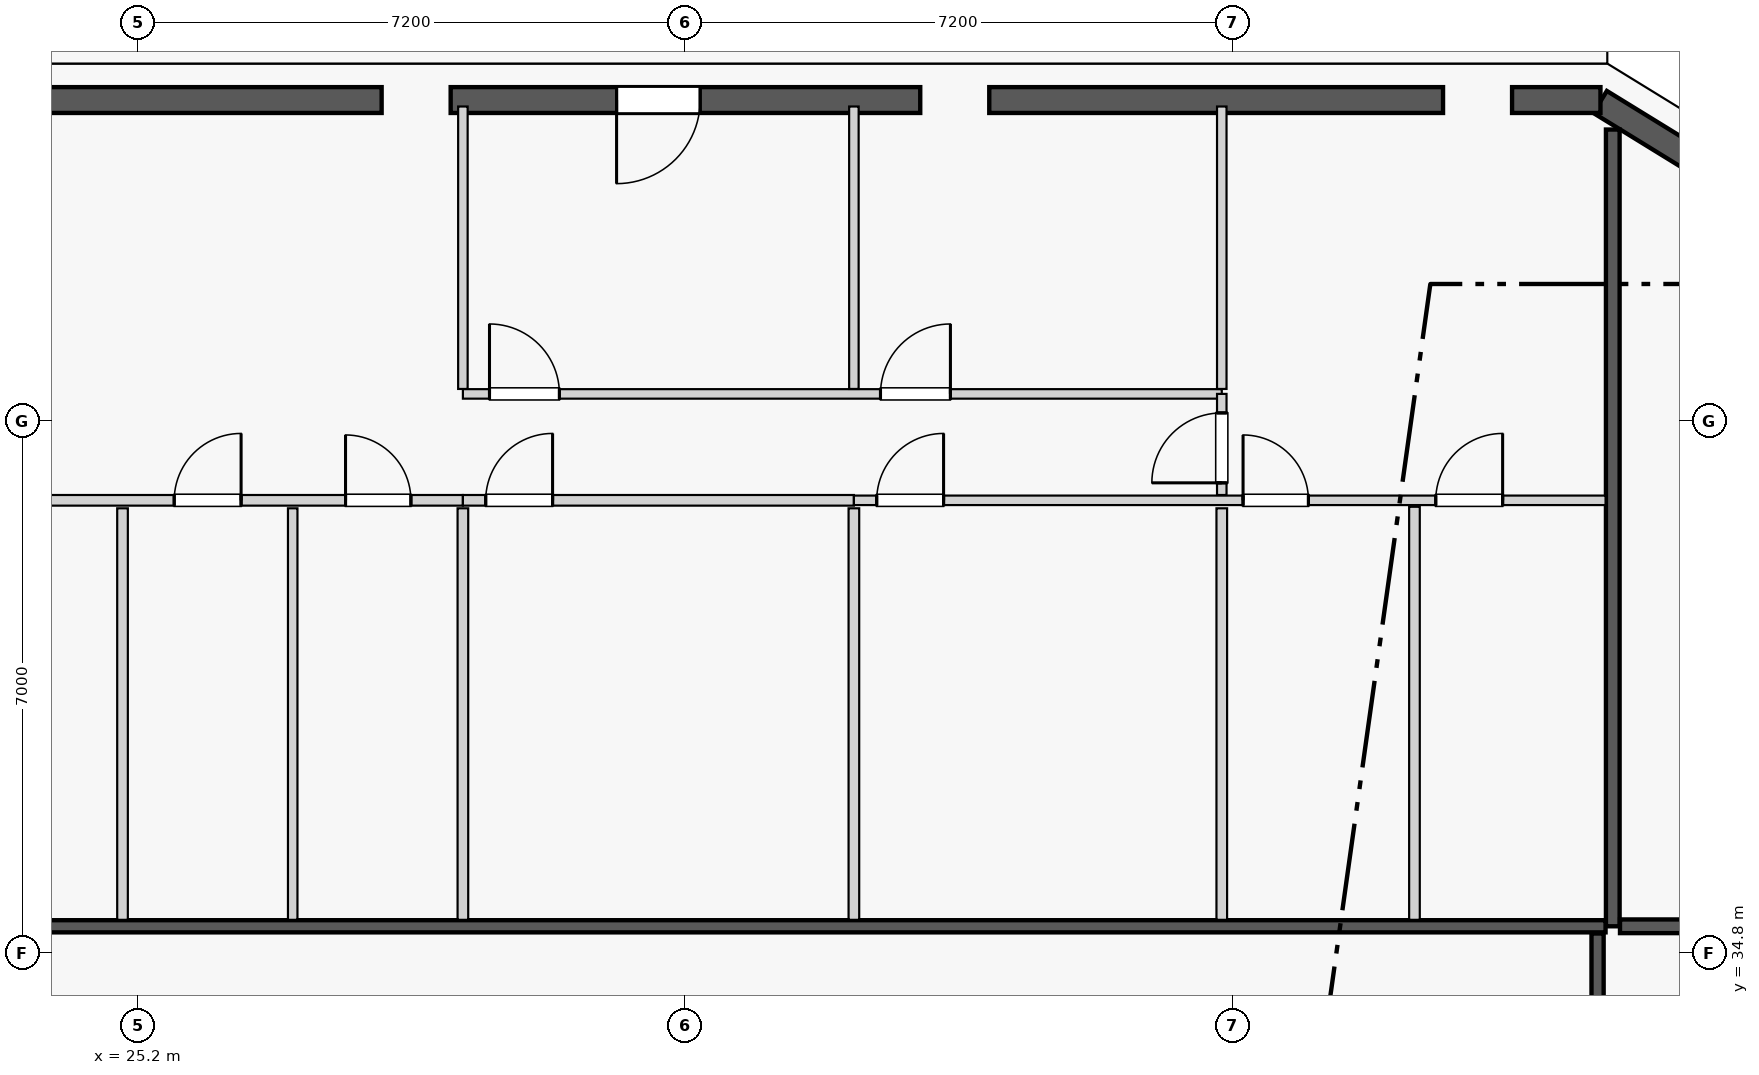
"""IFC4 building model, lengths in metres.
Left out: names, types, materials, properties, quantities, classifications, styles, units other than length and angle.
Written with IfcOpenShell. Run it as: python <this file> out.ifc"""

import sys

from ifc_helpers import new_model, si_unit, direction, frame, frame_2d, origin, origin_2d, place, context, subcontext, project, spatial, rectangle, extrude, element, fill, save


model = new_model("IFC4")
c1 = context("Model", 3, precision=1e-05, world=origin(), true_north=direction((0.0, 1.0)))
c2 = subcontext(c1, "Body", "Model", "MODEL_VIEW")
j1 = project(units=[si_unit("LENGTHUNIT", "METRE"), si_unit("PLANEANGLEUNIT", "RADIAN")], contexts=[c1])
p1 = place(None, origin())
s1 = spatial("IfcSite", under=j1, at=p1, CompositionType="ELEMENT")
p2 = place(p1, origin())
s2 = spatial("IfcBuilding", under=s1, at=p2, CompositionType="ELEMENT")
p3 = place(p2, frame((0.0, 0.0, 186.1)))
s3 = spatial("IfcBuildingStorey", under=s2, at=p3, CompositionType="ELEMENT", Elevation=186.1)
for number, where, z_axis, x_axis in (
    (1, (42.821, 46.011, 0.0), (0.0, 0.0, 1.0), (1.0, 0.0, 0.0)),
    (2, (35.943, 45.958, 0.0), (0.0, 0.0, 1.0), (1.0, 0.0, 0.0)),
    (3, (28.857, 45.958, 0.0), (0.0, 0.0, 1.0), (1.0, 0.0, 0.0)),
):
    element("IfcColumn", number, at=place(p3, frame(where, z_axis=z_axis, x_axis=x_axis)), inside=s3, PredefinedType="COLUMN", context=c2, shape_type="SweptSolid", body=[
        extrude(rectangle(XDim=0.9, YDim=0.9, at=origin_2d()), origin(), (0.0, 0.0, 1.0), 3.55),
    ])
p4 = place(p3, frame((44.658, 44.947, 0.0), z_axis=(0.0, 0.0, 1.0), x_axis=(-0.865230187018, 0.501374833306, 0.0)))
e4 = element("IfcColumn", 4, at=p4, inside=s3, PredefinedType="PILASTER", context=c2, shape_type="SweptSolid", body=[
    extrude(rectangle(XDim=0.5, YDim=0.35, at=origin_2d()), origin(), (0.0, 0.0, 1.0), 3.55),
])
p5 = place(p3, frame((45.862, 45.116, 0.0), z_axis=(0.0, 0.0, 1.0), x_axis=(-0.851713271379, 0.524008113828, 0.0)))
e5 = element("IfcWall", 5, at=p5, inside=s3, PredefinedType="STANDARD", context=c2, shape_type="SweptSolid", body=[
    extrude(rectangle(XDim=1.678, YDim=0.34, at=frame_2d((0.839, 0.0))), origin(), (0.0, 0.0, 1.0), 3.35),
])
p6 = place(p3, frame((44.438, 46.02, 0.0), z_axis=(0.0, 0.0, 1.0), x_axis=(-1.0, 0.0, 0.0)))
e6 = element("IfcWall", 6, at=p6, inside=s3, PredefinedType="STANDARD", context=c2, shape_type="SweptSolid", body=[
    extrude(rectangle(XDim=1.163, YDim=0.34, at=frame_2d((0.582, 0.0))), origin(), (0.0, 0.0, 1.0), 3.35),
])
p7 = place(p3, frame((42.367, 46.02, 0.0), z_axis=(0.0, 0.0, 1.0), x_axis=(-1.0, 0.0, 0.0)))
e7 = element("IfcWall", 7, at=p7, inside=s3, PredefinedType="STANDARD", context=c2, shape_type="SweptSolid", body=[
    extrude(rectangle(XDim=5.97, YDim=0.34, at=frame_2d((2.985, 0.0))), origin(), (0.0, 0.0, 1.0), 2.883),
])
p8 = place(p7, frame((0.849, 0.0, 0.75)))
e8 = element("IfcOpeningElement", 8, at=p8, cuts=e7, PredefinedType="OPENING", context=c2, shape_type="SweptSolid", body=[
    extrude(rectangle(XDim=1.1, YDim=1.983, at=frame_2d((0.55, 0.991))), frame((0.0, 0.18, 0.0), z_axis=(0.0, -1.0, 0.0), x_axis=(1.0, 0.0, 0.0)), (0.0, 0.0, 1.0), 0.36),
])
p9 = place(p7, frame((3.947, 0.0, 0.75)))
e9 = element("IfcOpeningElement", 9, at=p9, cuts=e7, PredefinedType="OPENING", context=c2, shape_type="SweptSolid", body=[
    extrude(rectangle(XDim=1.1, YDim=1.983, at=frame_2d((0.55, 0.991))), frame((0.0, 0.18, 0.0), z_axis=(0.0, -1.0, 0.0), x_axis=(1.0, 0.0, 0.0)), (0.0, 0.0, 1.0), 0.36),
])
p10 = place(p3, frame((35.489, 46.02, 0.0), z_axis=(0.0, 0.0, 1.0), x_axis=(-1.0, 0.0, 0.0)))
e10 = element("IfcWall", 10, at=p10, inside=s3, PredefinedType="STANDARD", context=c2, shape_type="SweptSolid", body=[
    extrude(rectangle(XDim=6.178, YDim=0.34, at=frame_2d((3.089, 0.0))), origin(), (0.0, 0.0, 1.0), 2.883),
])
p11 = place(p10, frame((2.895, 0.0, 0.0)))
e11 = element("IfcOpeningElement", 11, at=p11, cuts=e10, PredefinedType="OPENING", context=c2, shape_type="SweptSolid", body=[
    extrude(rectangle(XDim=1.1, YDim=2.25, at=frame_2d((0.55, 1.125))), frame((0.0, 0.18, 0.0), z_axis=(0.0, -1.0, 0.0), x_axis=(1.0, 0.0, 0.0)), (0.0, 0.0, 1.0), 0.36),
])
p12 = place(p3, frame((28.403, 46.02, 0.0), z_axis=(0.0, 0.0, 1.0), x_axis=(-1.0, 0.0, 0.0)))
e12 = element("IfcWall", 12, at=p12, inside=s3, PredefinedType="STANDARD", context=c2, shape_type="SweptSolid", body=[
    extrude(rectangle(XDim=5.97, YDim=0.34, at=frame_2d((2.985, 0.0))), origin(), (0.0, 0.0, 1.0), 2.883),
])
p13 = place(p12, frame((2.36, 0.0, 0.75)))
e13 = element("IfcOpeningElement", 13, at=p13, cuts=e12, PredefinedType="OPENING", context=c2, shape_type="SweptSolid", body=[
    extrude(rectangle(XDim=1.25, YDim=1.95, at=frame_2d((0.625, 0.975))), frame((0.0, 0.18, 0.0), z_axis=(0.0, -1.0, 0.0), x_axis=(1.0, 0.0, 0.0)), (0.0, 0.0, 1.0), 0.36),
])
p14 = place(p3, frame((44.6, 35.15, 0.0), z_axis=(0.0, 0.0, 1.0), x_axis=(0.0, 1.0, 0.0)))
e14 = element("IfcWall", 14, at=p14, inside=s3, PredefinedType="PARTITIONING", context=c2, shape_type="SweptSolid", body=[
    extrude(rectangle(XDim=10.482, YDim=0.18, at=frame_2d((5.241, 0.0))), origin(), (0.0, 0.0, 1.0), 3.35),
])
p15 = place(p3, frame((20.295, 35.15, 0.0), z_axis=(0.0, 0.0, 1.0), x_axis=(1.0, 0.0, 0.0)))
e15 = element("IfcWall", 15, at=p15, inside=s3, PredefinedType="PARTITIONING", context=c2, shape_type="SweptSolid", body=[
    extrude(rectangle(XDim=24.21, YDim=0.16, at=frame_2d((12.105, 0.0))), origin(), (0.0, 0.0, 1.0), 3.35),
])
p16 = place(p15, frame((0.405, 0.0, 0.0)))
e16 = element("IfcOpeningElement", 16, at=p16, cuts=e15, PredefinedType="OPENING", context=c2, shape_type="SweptSolid", body=[
    extrude(rectangle(XDim=1.35, YDim=2.35, at=frame_2d((0.675, 1.175))), frame((0.0, 0.09, 0.0), z_axis=(0.0, -1.0, 0.0), x_axis=(1.0, 0.0, 0.0)), (0.0, 0.0, 1.0), 0.18),
])
p17 = place(p3, frame((22.25, 40.754, 0.0), z_axis=(0.0, 0.0, 1.0), x_axis=(1.0, 0.0, 0.0)))
e17 = element("IfcWall", 17, at=p17, inside=s3, PredefinedType="PLUMBINGWALL", context=c2, shape_type="SweptSolid", body=[
    extrude(rectangle(XDim=7.222, YDim=0.14, at=frame_2d((3.611, 0.0))), origin(), (0.0, 0.0, 1.0), 3.35),
])
p18 = place(p17, frame((5.678, 0.0, 0.0)))
e18 = element("IfcOpeningElement", 18, at=p18, cuts=e17, PredefinedType="OPENING", context=c2, shape_type="SweptSolid", body=[
    extrude(rectangle(XDim=0.86, YDim=2.1, at=frame_2d((0.43, 1.05))), frame((0.0, 0.08, 0.0), z_axis=(0.0, -1.0, 0.0), x_axis=(1.0, 0.0, 0.0)), (0.0, 0.0, 1.0), 0.16),
])
p19 = place(p17, frame((0.26, 0.0, 0.0)))
e19 = element("IfcOpeningElement", 19, at=p19, cuts=e17, PredefinedType="OPENING", context=c2, shape_type="SweptSolid", body=[
    extrude(rectangle(XDim=0.88, YDim=2.15, at=frame_2d((0.44, 1.075))), frame((0.0, 0.08, 0.0), z_axis=(0.0, -1.0, 0.0), x_axis=(1.0, 0.0, 0.0)), (0.0, 0.0, 1.0), 0.16),
])
p20 = place(p17, frame((3.424, 0.0, 0.0)))
e20 = element("IfcOpeningElement", 20, at=p20, cuts=e17, PredefinedType="OPENING", context=c2, shape_type="SweptSolid", body=[
    extrude(rectangle(XDim=0.88, YDim=2.15, at=frame_2d((0.44, 1.075))), frame((0.0, 0.08, 0.0), z_axis=(0.0, -1.0, 0.0), x_axis=(1.0, 0.0, 0.0)), (0.0, 0.0, 1.0), 0.16),
])
p21 = place(p3, frame((29.472, 40.754, 0.0), z_axis=(0.0, 0.0, 1.0), x_axis=(1.0, 0.0, 0.0)))
e21 = element("IfcWall", 21, at=p21, inside=s3, PredefinedType="PLUMBINGWALL", context=c2, shape_type="SweptSolid", body=[
    extrude(rectangle(XDim=5.144, YDim=0.14, at=frame_2d((2.572, 0.0))), origin(), (0.0, 0.0, 1.0), 3.35),
])
p22 = place(p21, frame((0.3, 0.0, 0.0)))
e22 = element("IfcOpeningElement", 22, at=p22, cuts=e21, PredefinedType="OPENING", context=c2, shape_type="SweptSolid", body=[
    extrude(rectangle(XDim=0.88, YDim=2.15, at=frame_2d((0.44, 1.075))), frame((0.0, 0.08, 0.0), z_axis=(0.0, -1.0, 0.0), x_axis=(1.0, 0.0, 0.0)), (0.0, 0.0, 1.0), 0.16),
])
p23 = place(p3, frame((34.616, 40.754, 0.0), z_axis=(0.0, 0.0, 1.0), x_axis=(1.0, 0.0, 0.0)))
e23 = element("IfcWall", 23, at=p23, inside=s3, PredefinedType="PARTITIONING", context=c2, shape_type="SweptSolid", body=[
    extrude(rectangle(XDim=9.889, YDim=0.125, at=frame_2d((4.944, 0.0))), origin(), (0.0, 0.0, 1.0), 3.35),
])
p24 = place(p23, frame((5.12, 0.0, 0.0)))
e24 = element("IfcOpeningElement", 24, at=p24, cuts=e23, PredefinedType="OPENING", context=c2, shape_type="SweptSolid", body=[
    extrude(rectangle(XDim=0.86, YDim=2.1, at=frame_2d((0.43, 1.05))), frame((0.0, 0.073, 0.0), z_axis=(0.0, -1.0, 0.0), x_axis=(1.0, 0.0, 0.0)), (0.0, 0.0, 1.0), 0.145),
])
p25 = place(p23, frame((7.655, 0.0, 0.0)))
e25 = element("IfcOpeningElement", 25, at=p25, cuts=e23, PredefinedType="OPENING", context=c2, shape_type="SweptSolid", body=[
    extrude(rectangle(XDim=0.88, YDim=2.15, at=frame_2d((0.44, 1.075))), frame((0.0, 0.073, 0.0), z_axis=(0.0, -1.0, 0.0), x_axis=(1.0, 0.0, 0.0)), (0.0, 0.0, 1.0), 0.145),
])
p26 = place(p23, frame((0.3, 0.0, 0.0)))
e26 = element("IfcOpeningElement", 26, at=p26, cuts=e23, PredefinedType="OPENING", context=c2, shape_type="SweptSolid", body=[
    extrude(rectangle(XDim=0.88, YDim=2.15, at=frame_2d((0.44, 1.075))), frame((0.0, 0.073, 0.0), z_axis=(0.0, -1.0, 0.0), x_axis=(1.0, 0.0, 0.0)), (0.0, 0.0, 1.0), 0.145),
])
p27 = place(p3, frame((24.994, 35.235, 0.0), z_axis=(0.0, 0.0, 1.0), x_axis=(0.0, 1.0, 0.0)))
e27 = element("IfcWall", 27, at=p27, inside=s3, PredefinedType="PLUMBINGWALL", context=c2, shape_type="SweptSolid", body=[
    extrude(rectangle(XDim=5.414, YDim=0.14, at=frame_2d((2.707, 0.0))), origin(), (0.0, 0.0, 1.0), 3.35),
])
p28 = place(p3, frame((27.233, 35.235, 0.0), z_axis=(0.0, 0.0, 1.0), x_axis=(0.0, 1.0, 0.0)))
e28 = element("IfcWall", 28, at=p28, inside=s3, PredefinedType="PARTITIONING", context=c2, shape_type="SweptSolid", body=[
    extrude(rectangle(XDim=5.414, YDim=0.125, at=frame_2d((2.707, 0.0))), origin(), (0.0, 0.0, 1.0), 3.35),
])
p29 = place(p3, frame((29.472, 42.219, 0.0), z_axis=(0.0, 0.0, 1.0), x_axis=(0.0, 1.0, 0.0)))
e29 = element("IfcWall", 29, at=p29, inside=s3, PredefinedType="PARTITIONING", context=c2, shape_type="SweptSolid", body=[
    extrude(rectangle(XDim=3.716, YDim=0.125, at=frame_2d((1.858, 0.0))), origin(), (0.0, 0.0, 1.0), 3.35),
])
p30 = place(p3, frame((29.472, 42.154, 0.0), z_axis=(0.0, 0.0, 1.0), x_axis=(1.0, 0.0, 0.0)))
e30 = element("IfcWall", 30, at=p30, inside=s3, PredefinedType="PARTITIONING", context=c2, shape_type="SweptSolid", body=[
    extrude(rectangle(XDim=9.984, YDim=0.125, at=frame_2d((4.992, 0.0))), origin(), (0.0, 0.0, 1.0), 3.35),
])
p31 = place(p30, frame((0.35, 0.0, 0.0)))
e31 = element("IfcOpeningElement", 31, at=p31, cuts=e30, PredefinedType="OPENING", context=c2, shape_type="SweptSolid", body=[
    extrude(rectangle(XDim=0.92, YDim=2.15, at=frame_2d((0.46, 1.075))), frame((0.0, 0.073, 0.0), z_axis=(0.0, -1.0, 0.0), x_axis=(1.0, 0.0, 0.0)), (0.0, 0.0, 1.0), 0.145),
])
p32 = place(p30, frame((5.494, 0.0, 0.0)))
e32 = element("IfcOpeningElement", 32, at=p32, cuts=e30, PredefinedType="OPENING", context=c2, shape_type="SweptSolid", body=[
    extrude(rectangle(XDim=0.92, YDim=2.15, at=frame_2d((0.46, 1.075))), frame((0.0, 0.073, 0.0), z_axis=(0.0, -1.0, 0.0), x_axis=(1.0, 0.0, 0.0)), (0.0, 0.0, 1.0), 0.145),
])
p33 = place(p3, frame((39.456, 40.824, 0.0), z_axis=(0.0, 0.0, 1.0), x_axis=(0.0, 1.0, 0.0)))
e33 = element("IfcWall", 33, at=p33, inside=s3, PredefinedType="PARTITIONING", context=c2, shape_type="SweptSolid", body=[
    extrude(rectangle(XDim=1.33, YDim=0.125, at=frame_2d((0.665, 0.0))), origin(), (0.0, 0.0, 1.0), 3.35),
])
p34 = place(p33, frame((0.16, 0.0, 0.0)))
e34 = element("IfcOpeningElement", 34, at=p34, cuts=e33, PredefinedType="OPENING", context=c2, shape_type="SweptSolid", body=[
    extrude(rectangle(XDim=0.92, YDim=2.15, at=frame_2d((0.46, 1.075))), frame((0.0, 0.073, 0.0), z_axis=(0.0, -1.0, 0.0), x_axis=(1.0, 0.0, 0.0)), (0.0, 0.0, 1.0), 0.145),
])
for number, where, z_axis, x_axis in (
    (35, (29.472, 35.235, 0.0), (0.0, 0.0, 1.0), (0.0, 1.0, 0.0)),
    (36, (34.616, 35.235, 0.0), (0.0, 0.0, 1.0), (0.0, 1.0, 0.0)),
):
    element("IfcWall", number, at=place(p3, frame(where, z_axis=z_axis, x_axis=x_axis)), inside=s3, PredefinedType="PLUMBINGWALL", context=c2, shape_type="SweptSolid", body=[
        extrude(rectangle(XDim=5.414, YDim=0.14, at=frame_2d((2.707, 0.0))), origin(), (0.0, 0.0, 1.0), 3.35),
    ])
for number, where, z_axis, x_axis in (
    (37, (34.616, 42.219, 0.0), (0.0, 0.0, 1.0), (0.0, 1.0, 0.0)),
    (38, (39.456, 42.219, 0.0), (0.0, 0.0, 1.0), (0.0, 1.0, 0.0)),
):
    element("IfcWall", number, at=place(p3, frame(where, z_axis=z_axis, x_axis=x_axis)), inside=s3, PredefinedType="PARTITIONING", context=c2, shape_type="SweptSolid", body=[
        extrude(rectangle(XDim=3.716, YDim=0.125, at=frame_2d((1.858, 0.0))), origin(), (0.0, 0.0, 1.0), 3.35),
    ])
p35 = place(p3, frame((39.456, 35.235, 0.0), z_axis=(0.0, 0.0, 1.0), x_axis=(0.0, 1.0, 0.0)))
e39 = element("IfcWall", 39, at=p35, inside=s3, PredefinedType="PLUMBINGWALL", context=c2, shape_type="SweptSolid", body=[
    extrude(rectangle(XDim=5.414, YDim=0.14, at=frame_2d((2.707, 0.0))), origin(), (0.0, 0.0, 1.0), 3.35),
])
p36 = place(p3, frame((41.991, 35.235, 0.0), z_axis=(0.0, 0.0, 1.0), x_axis=(0.0, 1.0, 0.0)))
e40 = element("IfcWall", 40, at=p36, inside=s3, PredefinedType="PLUMBINGWALL", context=c2, shape_type="SweptSolid", body=[
    extrude(rectangle(XDim=5.434, YDim=0.14, at=frame_2d((2.717, 0.0))), origin(), (0.0, 0.0, 1.0), 2.807),
])
p37 = place(p3, frame((44.695, 35.15, 0.0), z_axis=(0.0, 0.0, 1.0), x_axis=(1.0, 0.0, 0.0)))
e41 = element("IfcWall", 41, at=p37, inside=s3, PredefinedType="PARTITIONING", context=c2, shape_type="SweptSolid", body=[
    extrude(rectangle(XDim=5.995, YDim=0.18, at=frame_2d((2.998, 0.0))), origin(), (0.0, 0.0, 1.0), 3.35),
])
p38 = place(p3, frame((44.4, 29.197, 0.0), z_axis=(0.0, 0.0, 1.0), x_axis=(0.0, 1.0, 0.0)))
e42 = element("IfcWall", 42, at=p38, inside=s3, PredefinedType="PARTITIONING", context=c2, shape_type="SweptSolid", body=[
    extrude(rectangle(XDim=5.858, YDim=0.16, at=frame_2d((2.929, 0.0))), origin(), (0.0, 0.0, 1.0), 3.35),
])
p39 = place(p38, frame((0.4, 0.0, 0.0)))
e43 = element("IfcOpeningElement", 43, at=p39, cuts=e42, PredefinedType="OPENING", context=c2, shape_type="SweptSolid", body=[
    extrude(rectangle(XDim=1.02, YDim=2.25, at=frame_2d((0.51, 1.125))), frame((0.0, 0.09, 0.0), z_axis=(0.0, -1.0, 0.0), x_axis=(1.0, 0.0, 0.0)), (0.0, 0.0, 1.0), 0.18),
])
p40 = place(p8, origin())
e44 = element("IfcWindow", 44, at=p40, inside=s3, PartitioningType="SINGLE_PANEL", PredefinedType="WINDOW", context=c2, shape_type="SweptSolid", body=[
    extrude(rectangle(XDim=1.1, YDim=1.983, at=frame_2d((0.55, 0.991))), frame((0.0, 0.03, 0.0), z_axis=(0.0, -1.0, 0.0), x_axis=(1.0, 0.0, 0.0)), (0.0, 0.0, 1.0), 0.06),
])
fill(e8, e44)
p41 = place(p11, origin())
e45 = element("IfcDoor", 45, at=p41, inside=s3, OperationType="SINGLE_SWING_RIGHT", PredefinedType="DOOR", context=c2, shape_type="SweptSolid", body=[
    extrude(rectangle(XDim=1.1, YDim=2.25, at=frame_2d((0.55, 1.125))), frame((0.0, 0.025, 0.0), z_axis=(0.0, -1.0, 0.0), x_axis=(1.0, 0.0, 0.0)), (0.0, 0.0, 1.0), 0.05),
])
fill(e11, e45)
p42 = place(p13, origin())
e46 = element("IfcWindow", 46, at=p42, inside=s3, PartitioningType="SINGLE_PANEL", PredefinedType="WINDOW", context=c2, shape_type="SweptSolid", body=[
    extrude(rectangle(XDim=1.25, YDim=1.95, at=frame_2d((0.625, 0.975))), frame((0.0, 0.03, 0.0), z_axis=(0.0, -1.0, 0.0), x_axis=(1.0, 0.0, 0.0)), (0.0, 0.0, 1.0), 0.06),
])
fill(e13, e46)
p43 = place(p18, origin())
e47 = element("IfcDoor", 47, at=p43, inside=s3, OperationType="SINGLE_SWING_LEFT", PredefinedType="DOOR", context=c2, shape_type="SweptSolid", body=[
    extrude(rectangle(XDim=0.86, YDim=2.1, at=frame_2d((0.43, 1.05))), frame((0.0, 0.025, 0.0), z_axis=(0.0, -1.0, 0.0), x_axis=(1.0, 0.0, 0.0)), (0.0, 0.0, 1.0), 0.05),
])
fill(e18, e47)
p44 = place(p24, origin())
e48 = element("IfcDoor", 48, at=p44, inside=s3, OperationType="SINGLE_SWING_LEFT", PredefinedType="DOOR", context=c2, shape_type="SweptSolid", body=[
    extrude(rectangle(XDim=0.86, YDim=2.1, at=frame_2d((0.43, 1.05))), frame((0.0, 0.025, 0.0), z_axis=(0.0, -1.0, 0.0), x_axis=(1.0, 0.0, 0.0)), (0.0, 0.0, 1.0), 0.05),
])
fill(e24, e48)
p45 = place(p25, origin())
e49 = element("IfcDoor", 49, at=p45, inside=s3, OperationType="SINGLE_SWING_RIGHT", PredefinedType="DOOR", context=c2, shape_type="SweptSolid", body=[
    extrude(rectangle(XDim=0.88, YDim=2.15, at=frame_2d((0.44, 1.075))), frame((0.0, 0.025, 0.0), z_axis=(0.0, -1.0, 0.0), x_axis=(1.0, 0.0, 0.0)), (0.0, 0.0, 1.0), 0.05),
])
fill(e25, e49)
p46 = place(p20, origin())
e50 = element("IfcDoor", 50, at=p46, inside=s3, OperationType="SINGLE_SWING_RIGHT", PredefinedType="DOOR", context=c2, shape_type="SweptSolid", body=[
    extrude(rectangle(XDim=0.88, YDim=2.15, at=frame_2d((0.44, 1.075))), frame((0.0, 0.025, 0.0), z_axis=(0.0, -1.0, 0.0), x_axis=(1.0, 0.0, 0.0)), (0.0, 0.0, 1.0), 0.05),
])
fill(e20, e50)
p47 = place(p22, origin())
e51 = element("IfcDoor", 51, at=p47, inside=s3, OperationType="SINGLE_SWING_RIGHT", PredefinedType="DOOR", context=c2, shape_type="SweptSolid", body=[
    extrude(rectangle(XDim=0.88, YDim=2.15, at=frame_2d((0.44, 1.075))), frame((0.0, 0.025, 0.0), z_axis=(0.0, -1.0, 0.0), x_axis=(1.0, 0.0, 0.0)), (0.0, 0.0, 1.0), 0.05),
])
fill(e22, e51)
p48 = place(p31, origin())
e52 = element("IfcDoor", 52, at=p48, inside=s3, OperationType="SINGLE_SWING_LEFT", PredefinedType="DOOR", context=c2, shape_type="SweptSolid", body=[
    extrude(rectangle(XDim=0.92, YDim=2.15, at=frame_2d((0.46, 1.075))), frame((0.0, 0.025, 0.0), z_axis=(0.0, -1.0, 0.0), x_axis=(1.0, 0.0, 0.0)), (0.0, 0.0, 1.0), 0.05),
])
fill(e31, e52)
p49 = place(p32, origin())
e53 = element("IfcDoor", 53, at=p49, inside=s3, OperationType="SINGLE_SWING_RIGHT", PredefinedType="DOOR", context=c2, shape_type="SweptSolid", body=[
    extrude(rectangle(XDim=0.92, YDim=2.15, at=frame_2d((0.46, 1.075))), frame((0.0, 0.025, 0.0), z_axis=(0.0, -1.0, 0.0), x_axis=(1.0, 0.0, 0.0)), (0.0, 0.0, 1.0), 0.05),
])
fill(e32, e53)
p50 = place(p34, origin())
e54 = element("IfcDoor", 54, at=p50, inside=s3, OperationType="SINGLE_SWING_LEFT", PredefinedType="DOOR", context=c2, shape_type="SweptSolid", body=[
    extrude(rectangle(XDim=0.92, YDim=2.15, at=frame_2d((0.46, 1.075))), frame((0.0, 0.025, 0.0), z_axis=(0.0, -1.0, 0.0), x_axis=(1.0, 0.0, 0.0)), (0.0, 0.0, 1.0), 0.05),
])
fill(e34, e54)
p51 = place(p26, origin())
e55 = element("IfcDoor", 55, at=p51, inside=s3, OperationType="SINGLE_SWING_RIGHT", PredefinedType="DOOR", context=c2, shape_type="SweptSolid", body=[
    extrude(rectangle(XDim=0.88, YDim=2.15, at=frame_2d((0.44, 1.075))), frame((0.0, 0.025, 0.0), z_axis=(0.0, -1.0, 0.0), x_axis=(1.0, 0.0, 0.0)), (0.0, 0.0, 1.0), 0.05),
])
fill(e26, e55)
p52 = place(p9, origin())
e56 = element("IfcWindow", 56, at=p52, inside=s3, PartitioningType="SINGLE_PANEL", PredefinedType="WINDOW", context=c2, shape_type="SweptSolid", body=[
    extrude(rectangle(XDim=1.1, YDim=1.983, at=frame_2d((0.55, 0.991))), frame((0.0, 0.03, 0.0), z_axis=(0.0, -1.0, 0.0), x_axis=(1.0, 0.0, 0.0)), (0.0, 0.0, 1.0), 0.06),
])
fill(e9, e56)
save(model, sys.argv[1])
